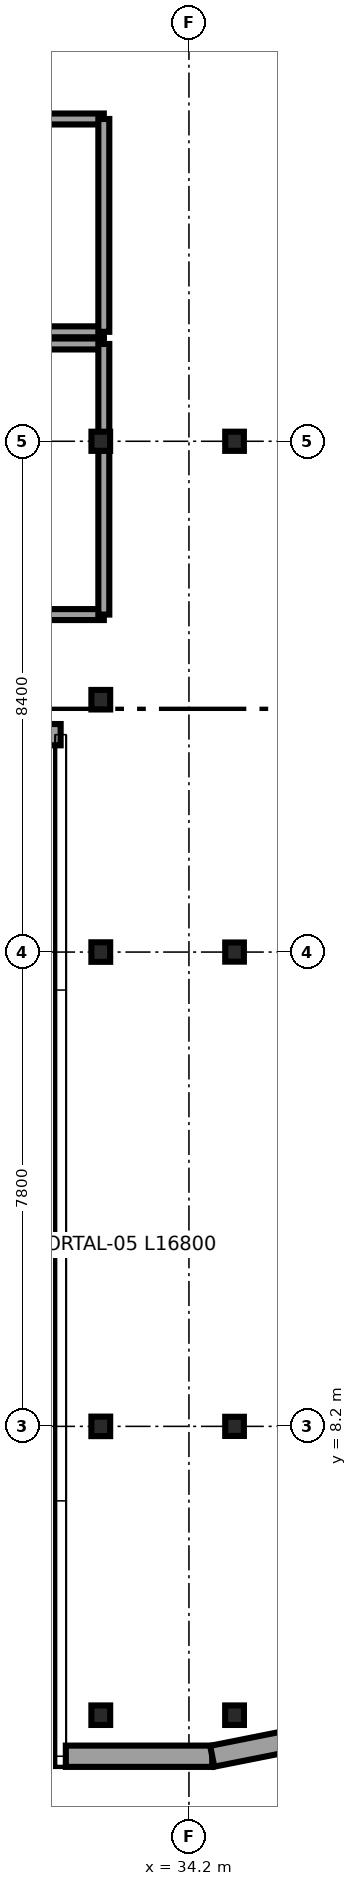
"""IFC4 building model, lengths in metres.
Left out: names, types, materials, properties, quantities, classifications, styles, units other than length and angle.
Written with IfcOpenShell. Run it as: python <this file> out.ifc"""

import sys

from ifc_helpers import new_model, si_unit, direction, frame, frame_2d, origin, origin_2d, place, context, subcontext, project, spatial, rectangle, i_section, extrude, source, transform, mapped, element, save


model = new_model("IFC4")
c1 = context("Model", 3, precision=1e-05, world=origin(), true_north=direction((0.0, 1.0)))
c2 = subcontext(c1, "Body", "Model", "MODEL_VIEW")
j1 = project(units=[si_unit("LENGTHUNIT", "METRE"), si_unit("PLANEANGLEUNIT", "RADIAN")], contexts=[c1])
p1 = place(None, origin())
s1 = spatial("IfcSite", under=j1, at=p1, CompositionType="ELEMENT")
p2 = place(p1, origin())
s2 = spatial("IfcBuilding", under=s1, at=p2, CompositionType="ELEMENT")
p3 = place(p2, frame((0.0, 0.0, 266.5)))
s3 = spatial("IfcBuildingStorey", under=s2, at=p3, CompositionType="ELEMENT", Elevation=266.5)
m1 = source(origin(), c2, "Body", "SweptSolid", [
    extrude(i_section(OverallWidth=0.309, OverallDepth=0.321, WebThickness=0.014, FlangeThickness=0.022, FilletRadius=0.017, at=origin_2d()), origin(), (0.0, 0.0, 1.0), 3.55),
])
for number, where, z_axis, x_axis in (
    (1, (32.75, 3.45, 0.0), (0.0, 0.0, 1.0), (1.0, 0.0, 0.0)),
    (2, (32.75, 8.2, 0.0), (0.0, 0.0, 1.0), (1.0, 0.0, 0.0)),
    (3, (32.75, 16.0, 0.0), (0.0, 0.0, 1.0), (1.0, 0.0, 0.0)),
    (4, (34.95, 3.45, 0.0), (0.0, 0.0, 1.0), (1.0, 0.0, 0.0)),
):
    element("IfcColumn", number, at=place(p3, frame(where, z_axis=z_axis, x_axis=x_axis)), inside=s3, PredefinedType="COLUMN", context=c2, shape_type="MappedRepresentation", body=[
        mapped(m1, transform((0.0, 0.0, 0.0), x_axis=(1.0, 0.0, 0.0), y_axis=(0.0, 1.0, 0.0), z_axis=(0.0, 0.0, 1.0), scale=1.0)),
    ])
m2 = source(origin(), c2, "Body", "SweptSolid", [
    extrude(i_section(OverallWidth=0.307, OverallDepth=0.315, WebThickness=0.012, FlangeThickness=0.019, FilletRadius=0.017, at=origin_2d()), origin(), (0.0, 0.0, 1.0), 3.55),
])
for number, where, z_axis, x_axis in (
    (5, (34.95, 8.2, 0.0), (0.0, 0.0, 1.0), (1.0, 0.0, 0.0)),
    (6, (34.95, 16.0, 0.0), (0.0, 0.0, 1.0), (1.0, 0.0, 0.0)),
    (7, (32.75, 24.4, 0.0), (0.0, 0.0, 1.0), (1.0, 0.0, 0.0)),
    (8, (34.95, 24.4, 0.0), (0.0, 0.0, 1.0), (1.0, 0.0, 0.0)),
):
    element("IfcColumn", number, at=place(p3, frame(where, z_axis=z_axis, x_axis=x_axis)), inside=s3, PredefinedType="COLUMN", context=c2, shape_type="MappedRepresentation", body=[
        mapped(m2, transform((0.0, 0.0, 0.0), x_axis=(1.0, 0.0, 0.0), y_axis=(0.0, 1.0, 0.0), z_axis=(0.0, 0.0, 1.0), scale=1.0)),
    ])
p4 = place(p3, frame((32.75, 20.15, 0.0), z_axis=(0.0, 0.0, 1.0), x_axis=(1.0, 0.0, 0.0)))
e9 = element("IfcColumn", 9, at=p4, inside=s3, PredefinedType="COLUMN", context=c2, shape_type="MappedRepresentation", body=[
    mapped(m1, transform((0.0, 0.0, 0.0), x_axis=(1.0, 0.0, 0.0), y_axis=(0.0, 1.0, 0.0), z_axis=(0.0, 0.0, 1.0), scale=1.0)),
])
p5 = place(p3, frame((15.11, 19.575, 0.0), z_axis=(0.0, 0.0, 1.0), x_axis=(1.0, 0.0, 0.0)))
e10 = element("IfcWall", 10, at=p5, inside=s3, PredefinedType="SOLIDWALL", context=c2, shape_type="SweptSolid", body=[
    extrude(rectangle(XDim=16.98, YDim=0.35, at=frame_2d((8.49, 0.0))), origin(), (0.0, 0.0, 1.0), 3.25),
])
p6 = place(p3, frame((32.175, 2.775, 0.0), z_axis=(0.0, 0.0, 1.0), x_axis=(1.0, 0.0, 0.0)))
e11 = element("IfcWall", 11, at=p6, inside=s3, PredefinedType="SOLIDWALL", context=c2, shape_type="SweptSolid", body=[
    extrude(rectangle(XDim=2.408, YDim=0.35, at=frame_2d((1.204, 0.0))), origin(), (0.0, 0.0, 1.0), 3.25),
])
p7 = place(p3, frame((34.583, 2.775, 0.0), z_axis=(0.0, 0.0, 1.0), x_axis=(0.980794424524, 0.195044345786, 0.0)))
e12 = element("IfcWall", 12, at=p7, inside=s3, PredefinedType="SOLIDWALL", context=c2, shape_type="SweptSolid", body=[
    extrude(rectangle(XDim=1.665, YDim=0.35, at=frame_2d((0.833, 0.0))), origin(), (0.0, 0.0, 1.0), 3.25),
])
p8 = place(p3, frame((11.9, 21.55, 0.0), z_axis=(0.0, 0.0, 1.0), x_axis=(1.0, 0.0, 0.0)))
e13 = element("IfcWall", 13, at=p8, inside=s3, PredefinedType="PARTITIONING", context=c2, shape_type="SweptSolid", body=[
    extrude(rectangle(XDim=20.9, YDim=0.18, at=frame_2d((10.45, 0.0))), origin(), (0.0, 0.0, 1.0), 3.25),
])
p9 = place(p8, frame((10.575, 0.0, 0.0)))
e14 = element("IfcOpeningElement", 14, at=p9, cuts=e13, PredefinedType="OPENING", context=c2, shape_type="SweptSolid", body=[
    extrude(rectangle(XDim=1.65, YDim=2.15, at=frame_2d((0.825, 1.075))), frame((0.0, 0.1, 0.0), z_axis=(0.0, -1.0, 0.0), x_axis=(1.0, 0.0, 0.0)), (0.0, 0.0, 1.0), 0.2),
])
p10 = place(p3, frame((11.9, 26.0, 0.0), z_axis=(0.0, 0.0, 1.0), x_axis=(1.0, 0.0, 0.0)))
e15 = element("IfcWall", 15, at=p10, inside=s3, PredefinedType="PARTITIONING", context=c2, shape_type="SweptSolid", body=[
    extrude(rectangle(XDim=20.9, YDim=0.18, at=frame_2d((10.45, 0.0))), origin(), (0.0, 0.0, 1.0), 3.25),
])
p11 = place(p3, frame((32.8, 21.55, 0.0), z_axis=(0.0, 0.0, 1.0), x_axis=(0.0, 1.0, 0.0)))
e16 = element("IfcWall", 16, at=p11, inside=s3, PredefinedType="PARTITIONING", context=c2, shape_type="SweptSolid", body=[
    extrude(rectangle(XDim=4.45, YDim=0.18, at=frame_2d((2.225, 0.0))), origin(), (0.0, 0.0, 1.0), 2.04),
])
p12 = place(p3, frame((11.9, 26.2, 0.0), z_axis=(0.0, 0.0, 1.0), x_axis=(1.0, 0.0, 0.0)))
e17 = element("IfcWall", 17, at=p12, inside=s3, PredefinedType="PARTITIONING", context=c2, shape_type="SweptSolid", body=[
    extrude(rectangle(XDim=20.9, YDim=0.18, at=frame_2d((10.45, 0.0))), origin(), (0.0, 0.0, 1.0), 3.25),
])
p13 = place(p3, frame((11.9, 29.7, 0.0), z_axis=(0.0, 0.0, 1.0), x_axis=(1.0, 0.0, 0.0)))
e18 = element("IfcWall", 18, at=p13, inside=s3, PredefinedType="PARTITIONING", context=c2, shape_type="SweptSolid", body=[
    extrude(rectangle(XDim=20.9, YDim=0.18, at=frame_2d((10.45, 0.0))), origin(), (0.0, 0.0, 1.0), 3.25),
])
p14 = place(p13, frame((10.575, 0.0, 0.0)))
e19 = element("IfcOpeningElement", 19, at=p14, cuts=e18, PredefinedType="OPENING", context=c2, shape_type="SweptSolid", body=[
    extrude(rectangle(XDim=1.65, YDim=2.15, at=frame_2d((0.825, 1.075))), frame((0.0, 0.1, 0.0), z_axis=(0.0, -1.0, 0.0), x_axis=(1.0, 0.0, 0.0)), (0.0, 0.0, 1.0), 0.2),
])
p15 = place(p3, frame((32.8, 26.2, 0.0), z_axis=(0.0, 0.0, 1.0), x_axis=(0.0, 1.0, 0.0)))
e20 = element("IfcWall", 20, at=p15, inside=s3, PredefinedType="PARTITIONING", context=c2, shape_type="SweptSolid", body=[
    extrude(rectangle(XDim=3.5, YDim=0.18, at=frame_2d((1.75, 0.0))), origin(), (0.0, 0.0, 1.0), 2.04),
])
save(model, sys.argv[1])
